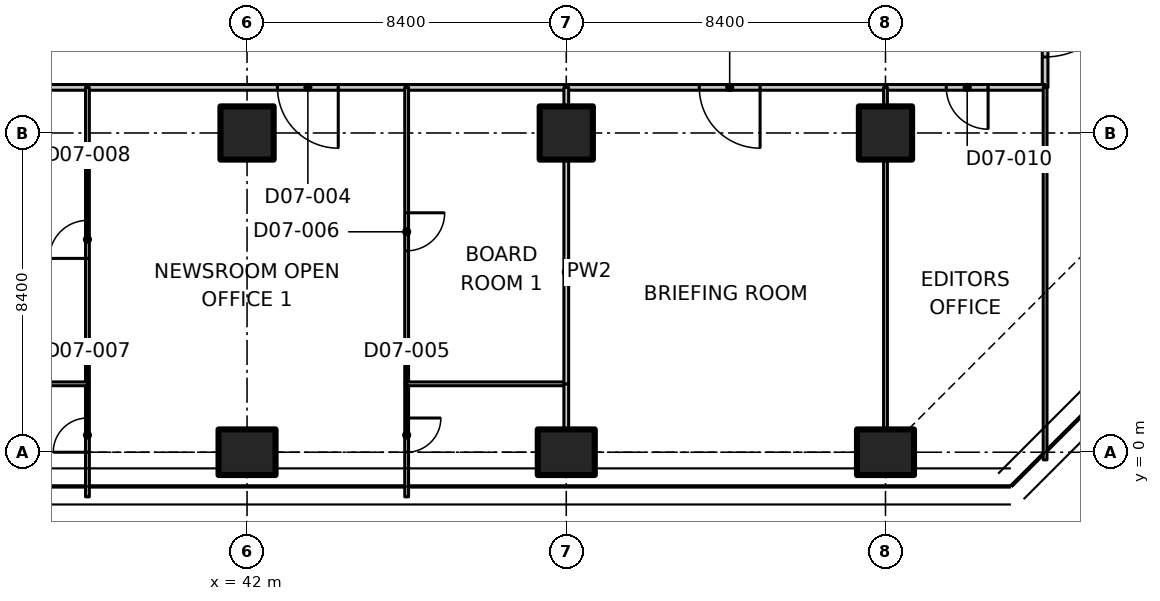
"""IFC4 building model, lengths in metres.
Left out: names, types, materials, properties, quantities, classifications, styles, units other than length and angle.
Written with IfcOpenShell. Run it as: python <this file> out.ifc"""

import sys

from ifc_helpers import new_model, si_unit, direction, frame, frame_2d, origin, origin_2d, place, context, subcontext, project, spatial, polyline, rectangle, outline, extrude, element, fill, save


model = new_model("IFC4")
c1 = context("Model", 3, precision=1e-05, world=origin(), true_north=direction((0.0, 1.0)))
c2 = subcontext(c1, "Body", "Model", "MODEL_VIEW")
j1 = project(units=[si_unit("LENGTHUNIT", "METRE"), si_unit("PLANEANGLEUNIT", "RADIAN")], contexts=[c1])
p1 = place(None, origin())
s1 = spatial("IfcSite", under=j1, at=p1, CompositionType="ELEMENT")
p2 = place(p1, origin())
s2 = spatial("IfcBuilding", under=s1, at=p2, CompositionType="ELEMENT")
p3 = place(p2, frame((0.0, 0.0, 40.1)))
s3 = spatial("IfcBuildingStorey", under=s2, at=p3, CompositionType="ELEMENT", Elevation=40.1)
p4 = place(p3, frame((42.0, 0.0, 0.0), z_axis=(0.0, 0.0, 1.0), x_axis=(0.0, 1.0, 0.0)))
e1 = element("IfcColumn", 1, at=p4, inside=s3, PredefinedType="COLUMN", context=c2, shape_type="SweptSolid", body=[
    extrude(rectangle(XDim=1.2, YDim=1.5, at=origin_2d()), origin(), (0.0, 0.0, 1.0), 3.35),
])
p5 = place(p3, frame((42.0, 8.4, 0.0), z_axis=(0.0, 0.0, 1.0), x_axis=(1.0, 0.0, 0.0)))
e2 = element("IfcColumn", 2, at=p5, inside=s3, PredefinedType="COLUMN", context=c2, shape_type="SweptSolid", body=[
    extrude(rectangle(XDim=1.4, YDim=1.4, at=origin_2d()), origin(), (0.0, 0.0, 1.0), 3.35),
])
p6 = place(p3, frame((50.4, 0.0, 0.0), z_axis=(0.0, 0.0, 1.0), x_axis=(0.0, 1.0, 0.0)))
e3 = element("IfcColumn", 3, at=p6, inside=s3, PredefinedType="COLUMN", context=c2, shape_type="SweptSolid", body=[
    extrude(rectangle(XDim=1.2, YDim=1.5, at=origin_2d()), origin(), (0.0, 0.0, 1.0), 3.35),
])
p7 = place(p3, frame((50.4, 8.4, 0.0), z_axis=(0.0, 0.0, 1.0), x_axis=(1.0, 0.0, 0.0)))
e4 = element("IfcColumn", 4, at=p7, inside=s3, PredefinedType="COLUMN", context=c2, shape_type="SweptSolid", body=[
    extrude(rectangle(XDim=1.4, YDim=1.4, at=origin_2d()), origin(), (0.0, 0.0, 1.0), 3.35),
])
p8 = place(p3, frame((58.8, 0.0, 0.0), z_axis=(0.0, 0.0, 1.0), x_axis=(0.0, 1.0, 0.0)))
e5 = element("IfcColumn", 5, at=p8, inside=s3, PredefinedType="COLUMN", context=c2, shape_type="SweptSolid", body=[
    extrude(rectangle(XDim=1.2, YDim=1.5, at=origin_2d()), origin(), (0.0, 0.0, 1.0), 3.35),
])
p9 = place(p3, frame((58.8, 8.4, 0.0), z_axis=(0.0, 0.0, 1.0), x_axis=(1.0, 0.0, 0.0)))
e6 = element("IfcColumn", 6, at=p9, inside=s3, PredefinedType="COLUMN", context=c2, shape_type="SweptSolid", body=[
    extrude(rectangle(XDim=1.4, YDim=1.4, at=origin_2d()), origin(), (0.0, 0.0, 1.0), 3.35),
])
p10 = place(p3, frame((63.0, 13.0, 0.0), z_axis=(0.0, 0.0, 1.0), x_axis=(0.0, -1.0, 0.0)))
e7 = element("IfcWall", 7, at=p10, inside=s3, PredefinedType="PARTITIONING", context=c2, shape_type="SweptSolid", body=[
    extrude(rectangle(XDim=3.4, YDim=0.15, at=frame_2d((1.7, 0.0))), origin(), (0.0, 0.0, 1.0), 3.33),
])
p11 = place(p10, frame((0.6, 0.0, 0.0)))
e8 = element("IfcOpeningElement", 8, at=p11, cuts=e7, PredefinedType="OPENING", context=c2, shape_type="SweptSolid", body=[
    extrude(rectangle(XDim=2.0, YDim=2.4, at=frame_2d((1.0, 1.2))), frame((0.0, 0.085, 0.0), z_axis=(0.0, -1.0, 0.0), x_axis=(1.0, 0.0, 0.0)), (0.0, 0.0, 1.0), 0.17),
])
p12 = place(p3, frame((46.2, 9.6, 0.0), z_axis=(0.0, 0.0, 1.0), x_axis=(-1.0, 0.0, 0.0)))
e9 = element("IfcWall", 9, at=p12, inside=s3, PredefinedType="PARTITIONING", context=c2, shape_type="SweptSolid", body=[
    extrude(rectangle(XDim=8.4, YDim=0.15, at=frame_2d((4.2, 0.0))), origin(), (0.0, 0.0, 1.0), 3.33),
])
p13 = place(p12, frame((1.8, 0.0, 0.0)))
e10 = element("IfcOpeningElement", 10, at=p13, cuts=e9, PredefinedType="OPENING", context=c2, shape_type="SweptSolid", body=[
    extrude(rectangle(XDim=1.6, YDim=2.1, at=frame_2d((0.8, 1.05))), frame((0.0, 0.085, 0.0), z_axis=(0.0, -1.0, 0.0), x_axis=(1.0, 0.0, 0.0)), (0.0, 0.0, 1.0), 0.17),
])
for number, where, z_axis, x_axis in (
    (11, (50.4, 9.6, 0.0), (0.0, 0.0, 1.0), (-1.0, 0.0, 0.0)),
    (12, (37.8, 9.6, 0.0), (0.0, 0.0, 1.0), (-1.0, 0.0, 0.0)),
):
    element("IfcWall", number, at=place(p3, frame(where, z_axis=z_axis, x_axis=x_axis)), inside=s3, PredefinedType="PARTITIONING", context=c2, shape_type="SweptSolid", body=[
        extrude(rectangle(XDim=4.2, YDim=0.15, at=frame_2d((2.1, 0.0))), origin(), (0.0, 0.0, 1.0), 3.33),
    ])
p14 = place(p3, frame((58.8, 9.6, 0.0), z_axis=(0.0, 0.0, 1.0), x_axis=(-1.0, 0.0, 0.0)))
e13 = element("IfcWall", 13, at=p14, inside=s3, PredefinedType="PARTITIONING", context=c2, shape_type="SweptSolid", body=[
    extrude(rectangle(XDim=8.4, YDim=0.15, at=frame_2d((4.2, 0.0))), origin(), (0.0, 0.0, 1.0), 3.33),
])
p15 = place(p14, frame((3.3, 0.0, 0.0)))
e14 = element("IfcOpeningElement", 14, at=p15, cuts=e13, PredefinedType="OPENING", context=c2, shape_type="SweptSolid", body=[
    extrude(rectangle(XDim=1.6, YDim=2.1, at=frame_2d((0.8, 1.05))), frame((0.0, 0.085, 0.0), z_axis=(0.0, -1.0, 0.0), x_axis=(1.0, 0.0, 0.0)), (0.0, 0.0, 1.0), 0.17),
])
p16 = place(p3, frame((63.0, 9.6, 0.0), z_axis=(0.0, 0.0, 1.0), x_axis=(-1.0, 0.0, 0.0)))
e15 = element("IfcWall", 15, at=p16, inside=s3, PredefinedType="PARTITIONING", context=c2, shape_type="SweptSolid", body=[
    extrude(rectangle(XDim=4.2, YDim=0.15, at=frame_2d((2.1, 0.0))), origin(), (0.0, 0.0, 1.0), 3.33),
])
p17 = place(p16, frame((1.5, 0.0, 0.0)))
e16 = element("IfcOpeningElement", 16, at=p17, cuts=e15, PredefinedType="OPENING", context=c2, shape_type="SweptSolid", body=[
    extrude(rectangle(XDim=1.1, YDim=2.1, at=frame_2d((0.55, 1.05))), frame((0.0, 0.085, 0.0), z_axis=(0.0, -1.0, 0.0), x_axis=(1.0, 0.0, 0.0)), (0.0, 0.0, 1.0), 0.17),
])
p18 = place(p3, frame((63.0, -0.2, 0.0), z_axis=(0.0, 0.0, 1.0), x_axis=(0.0, 1.0, 0.0)))
e17 = element("IfcWall", 17, at=p18, inside=s3, PredefinedType="PARTITIONING", context=c2, shape_type="SweptSolid", body=[
    extrude(outline(polyline([(0.0, 0.0), (9.8, 0.0), (9.8, 3.33), (5.066, 3.33), (5.064, 2.98), (3.736, 2.98), (3.734, 3.33), (0.0, 3.33), (0.0, 0.0)])), frame((0.0, 0.05, 0.0), z_axis=(0.0, -1.0, 0.0), x_axis=(1.0, 0.0, 0.0)), (0.0, 0.0, 1.0), 0.1),
])
p19 = place(p3, frame((46.2, 1.8, 0.0), z_axis=(0.0, 0.0, 1.0), x_axis=(0.0, -1.0, 0.0)))
e18 = element("IfcWall", 18, at=p19, inside=s3, PredefinedType="PARTITIONING", context=c2, shape_type="SweptSolid", body=[
    extrude(rectangle(XDim=2.974, YDim=0.1, at=frame_2d((1.487, 0.0))), origin(), (0.0, 0.0, 1.0), 2.98),
])
p20 = place(p19, frame((0.9, 0.0, 0.0)))
e19 = element("IfcOpeningElement", 19, at=p20, cuts=e18, PredefinedType="OPENING", context=c2, shape_type="SweptSolid", body=[
    extrude(rectangle(XDim=0.9, YDim=2.1, at=frame_2d((0.45, 1.05))), frame((0.0, 0.06, 0.0), z_axis=(0.0, -1.0, 0.0), x_axis=(1.0, 0.0, 0.0)), (0.0, 0.0, 1.0), 0.12),
])
p21 = place(p3, frame((46.2, 9.6, 0.0), z_axis=(0.0, 0.0, 1.0), x_axis=(0.0, -1.0, 0.0)))
e20 = element("IfcWall", 20, at=p21, inside=s3, PredefinedType="PARTITIONING", context=c2, shape_type="SweptSolid", body=[
    extrude(rectangle(XDim=7.8, YDim=0.1, at=frame_2d((3.9, 0.0))), origin(), (0.0, 0.0, 1.0), 3.33),
])
p22 = place(p21, frame((3.3, 0.0, 0.0)))
e21 = element("IfcOpeningElement", 21, at=p22, cuts=e20, PredefinedType="OPENING", context=c2, shape_type="SweptSolid", body=[
    extrude(rectangle(XDim=1.0, YDim=2.1, at=frame_2d((0.5, 1.05))), frame((0.0, 0.06, 0.0), z_axis=(0.0, -1.0, 0.0), x_axis=(1.0, 0.0, 0.0)), (0.0, 0.0, 1.0), 0.12),
])
p23 = place(p3, frame((37.8, -1.174, 0.0), z_axis=(0.0, 0.0, 1.0), x_axis=(0.0, 1.0, 0.0)))
e22 = element("IfcWall", 22, at=p23, inside=s3, PredefinedType="PARTITIONING", context=c2, shape_type="SweptSolid", body=[
    extrude(rectangle(XDim=2.974, YDim=0.1, at=frame_2d((1.487, 0.0))), origin(), (0.0, 0.0, 1.0), 2.98),
])
p24 = place(p23, frame((1.174, 0.0, 0.0)))
e23 = element("IfcOpeningElement", 23, at=p24, cuts=e22, PredefinedType="OPENING", context=c2, shape_type="SweptSolid", body=[
    extrude(rectangle(XDim=0.9, YDim=2.1, at=frame_2d((0.45, 1.05))), frame((0.0, 0.06, 0.0), z_axis=(0.0, -1.0, 0.0), x_axis=(1.0, 0.0, 0.0)), (0.0, 0.0, 1.0), 0.12),
])
p25 = place(p3, frame((37.8, 1.8, 0.0), z_axis=(0.0, 0.0, 1.0), x_axis=(0.0, 1.0, 0.0)))
e24 = element("IfcWall", 24, at=p25, inside=s3, PredefinedType="PARTITIONING", context=c2, shape_type="SweptSolid", body=[
    extrude(rectangle(XDim=7.8, YDim=0.1, at=frame_2d((3.9, 0.0))), origin(), (0.0, 0.0, 1.0), 3.33),
])
p26 = place(p25, frame((3.3, 0.0, 0.0)))
e25 = element("IfcOpeningElement", 25, at=p26, cuts=e24, PredefinedType="OPENING", context=c2, shape_type="SweptSolid", body=[
    extrude(rectangle(XDim=1.0, YDim=2.1, at=frame_2d((0.5, 1.05))), frame((0.0, 0.06, 0.0), z_axis=(0.0, -1.0, 0.0), x_axis=(1.0, 0.0, 0.0)), (0.0, 0.0, 1.0), 0.12),
])
p27 = place(p3, frame((46.2, 1.8, 0.0), z_axis=(0.0, 0.0, 1.0), x_axis=(1.0, 0.0, 0.0)))
e26 = element("IfcWall", 26, at=p27, inside=s3, PredefinedType="PARTITIONING", context=c2, shape_type="SweptSolid", body=[
    extrude(rectangle(XDim=4.2, YDim=0.1, at=frame_2d((2.1, 0.0))), origin(), (0.0, 0.0, 1.0), 3.33),
])
p28 = place(p3, frame((50.4, 1.8, 0.0), z_axis=(0.0, 0.0, 1.0), x_axis=(0.0, -1.0, 0.0)))
e27 = element("IfcWall", 27, at=p28, inside=s3, PredefinedType="PARTITIONING", context=c2, shape_type="SweptSolid", body=[
    extrude(rectangle(XDim=1.18, YDim=0.125, at=frame_2d((0.59, 0.0))), origin(), (0.0, 0.0, 1.0), 3.33),
])
p29 = place(p3, frame((50.4, 9.6, 0.0), z_axis=(0.0, 0.0, 1.0), x_axis=(0.0, -1.0, 0.0)))
e28 = element("IfcWall", 28, at=p29, inside=s3, PredefinedType="PARTITIONING", context=c2, shape_type="SweptSolid", body=[
    extrude(rectangle(XDim=0.48, YDim=0.125, at=frame_2d((0.24, 0.0))), origin(), (0.0, 0.0, 1.0), 3.33),
])
p30 = place(p3, frame((50.4, 7.68, 0.0), z_axis=(0.0, 0.0, 1.0), x_axis=(0.0, -1.0, 0.0)))
e29 = element("IfcWall", 29, at=p30, inside=s3, PredefinedType="PARTITIONING", context=c2, shape_type="SweptSolid", body=[
    extrude(rectangle(XDim=5.88, YDim=0.125, at=frame_2d((2.94, 0.0))), origin(), (0.0, 0.0, 1.0), 3.33),
])
p31 = place(p3, frame((33.6, 1.8, 0.0), z_axis=(0.0, 0.0, 1.0), x_axis=(1.0, 0.0, 0.0)))
e30 = element("IfcWall", 30, at=p31, inside=s3, PredefinedType="PARTITIONING", context=c2, shape_type="SweptSolid", body=[
    extrude(rectangle(XDim=4.2, YDim=0.1, at=frame_2d((2.1, 0.0))), origin(), (0.0, 0.0, 1.0), 3.33),
])
p32 = place(p3, frame((58.8, 9.6, 0.0), z_axis=(0.0, 0.0, 1.0), x_axis=(0.0, -1.0, 0.0)))
e31 = element("IfcWall", 31, at=p32, inside=s3, PredefinedType="PARTITIONING", context=c2, shape_type="SweptSolid", body=[
    extrude(rectangle(XDim=0.48, YDim=0.1, at=frame_2d((0.24, 0.0))), origin(), (0.0, 0.0, 1.0), 3.33),
])
p33 = place(p3, frame((58.8, 7.68, 0.0), z_axis=(0.0, 0.0, 1.0), x_axis=(0.0, -1.0, 0.0)))
e32 = element("IfcWall", 32, at=p33, inside=s3, PredefinedType="PARTITIONING", context=c2, shape_type="SweptSolid", body=[
    extrude(rectangle(XDim=7.06, YDim=0.1, at=frame_2d((3.53, 0.0))), origin(), (0.0, 0.0, 1.0), 3.33),
])
p34 = place(p11, origin())
e33 = element("IfcDoor", 33, at=p34, inside=s3, OperationType="DOUBLE_DOOR_SINGLE_SWING", PredefinedType="DOOR", context=c2, shape_type="SweptSolid", body=[
    extrude(rectangle(XDim=2.0, YDim=2.4, at=frame_2d((1.0, 1.2))), frame((0.0, 0.025, 0.0), z_axis=(0.0, -1.0, 0.0), x_axis=(1.0, 0.0, 0.0)), (0.0, 0.0, 1.0), 0.05),
])
fill(e8, e33)
p35 = place(p13, origin())
e34 = element("IfcDoor", 34, at=p35, inside=s3, OperationType="DOUBLE_DOOR_SINGLE_SWING", PredefinedType="DOOR", context=c2, shape_type="SweptSolid", body=[
    extrude(rectangle(XDim=1.6, YDim=2.1, at=frame_2d((0.8, 1.05))), frame((0.0, 0.025, 0.0), z_axis=(0.0, -1.0, 0.0), x_axis=(1.0, 0.0, 0.0)), (0.0, 0.0, 1.0), 0.05),
])
fill(e10, e34)
p36 = place(p20, origin())
e35 = element("IfcDoor", 35, at=p36, inside=s3, OperationType="SINGLE_SWING_LEFT", PredefinedType="DOOR", context=c2, shape_type="SweptSolid", body=[
    extrude(rectangle(XDim=0.9, YDim=2.1, at=frame_2d((0.45, 1.05))), frame((0.0, 0.025, 0.0), z_axis=(0.0, -1.0, 0.0), x_axis=(1.0, 0.0, 0.0)), (0.0, 0.0, 1.0), 0.05),
])
fill(e19, e35)
p37 = place(p22, origin())
e36 = element("IfcDoor", 36, at=p37, inside=s3, OperationType="SINGLE_SWING_LEFT", PredefinedType="DOOR", context=c2, shape_type="SweptSolid", body=[
    extrude(rectangle(XDim=1.0, YDim=2.1, at=frame_2d((0.5, 1.05))), frame((0.0, 0.025, 0.0), z_axis=(0.0, -1.0, 0.0), x_axis=(1.0, 0.0, 0.0)), (0.0, 0.0, 1.0), 0.05),
])
fill(e21, e36)
p38 = place(p24, origin())
e37 = element("IfcDoor", 37, at=p38, inside=s3, OperationType="SINGLE_SWING_LEFT", PredefinedType="DOOR", context=c2, shape_type="SweptSolid", body=[
    extrude(rectangle(XDim=0.9, YDim=2.1, at=frame_2d((0.45, 1.05))), frame((0.0, 0.025, 0.0), z_axis=(0.0, -1.0, 0.0), x_axis=(1.0, 0.0, 0.0)), (0.0, 0.0, 1.0), 0.05),
])
fill(e23, e37)
p39 = place(p26, origin())
e38 = element("IfcDoor", 38, at=p39, inside=s3, OperationType="SINGLE_SWING_LEFT", PredefinedType="DOOR", context=c2, shape_type="SweptSolid", body=[
    extrude(rectangle(XDim=1.0, YDim=2.1, at=frame_2d((0.5, 1.05))), frame((0.0, 0.025, 0.0), z_axis=(0.0, -1.0, 0.0), x_axis=(1.0, 0.0, 0.0)), (0.0, 0.0, 1.0), 0.05),
])
fill(e25, e38)
p40 = place(p15, origin())
e39 = element("IfcDoor", 39, at=p40, inside=s3, OperationType="DOUBLE_DOOR_SINGLE_SWING", PredefinedType="DOOR", context=c2, shape_type="SweptSolid", body=[
    extrude(rectangle(XDim=1.6, YDim=2.1, at=frame_2d((0.8, 1.05))), frame((0.0, 0.025, 0.0), z_axis=(0.0, -1.0, 0.0), x_axis=(1.0, 0.0, 0.0)), (0.0, 0.0, 1.0), 0.05),
])
fill(e14, e39)
p41 = place(p17, origin())
e40 = element("IfcDoor", 40, at=p41, inside=s3, OperationType="SINGLE_SWING_LEFT", PredefinedType="DOOR", context=c2, shape_type="SweptSolid", body=[
    extrude(rectangle(XDim=1.1, YDim=2.1, at=frame_2d((0.55, 1.05))), frame((0.0, 0.025, 0.0), z_axis=(0.0, -1.0, 0.0), x_axis=(1.0, 0.0, 0.0)), (0.0, 0.0, 1.0), 0.05),
])
fill(e16, e40)
save(model, sys.argv[1])
